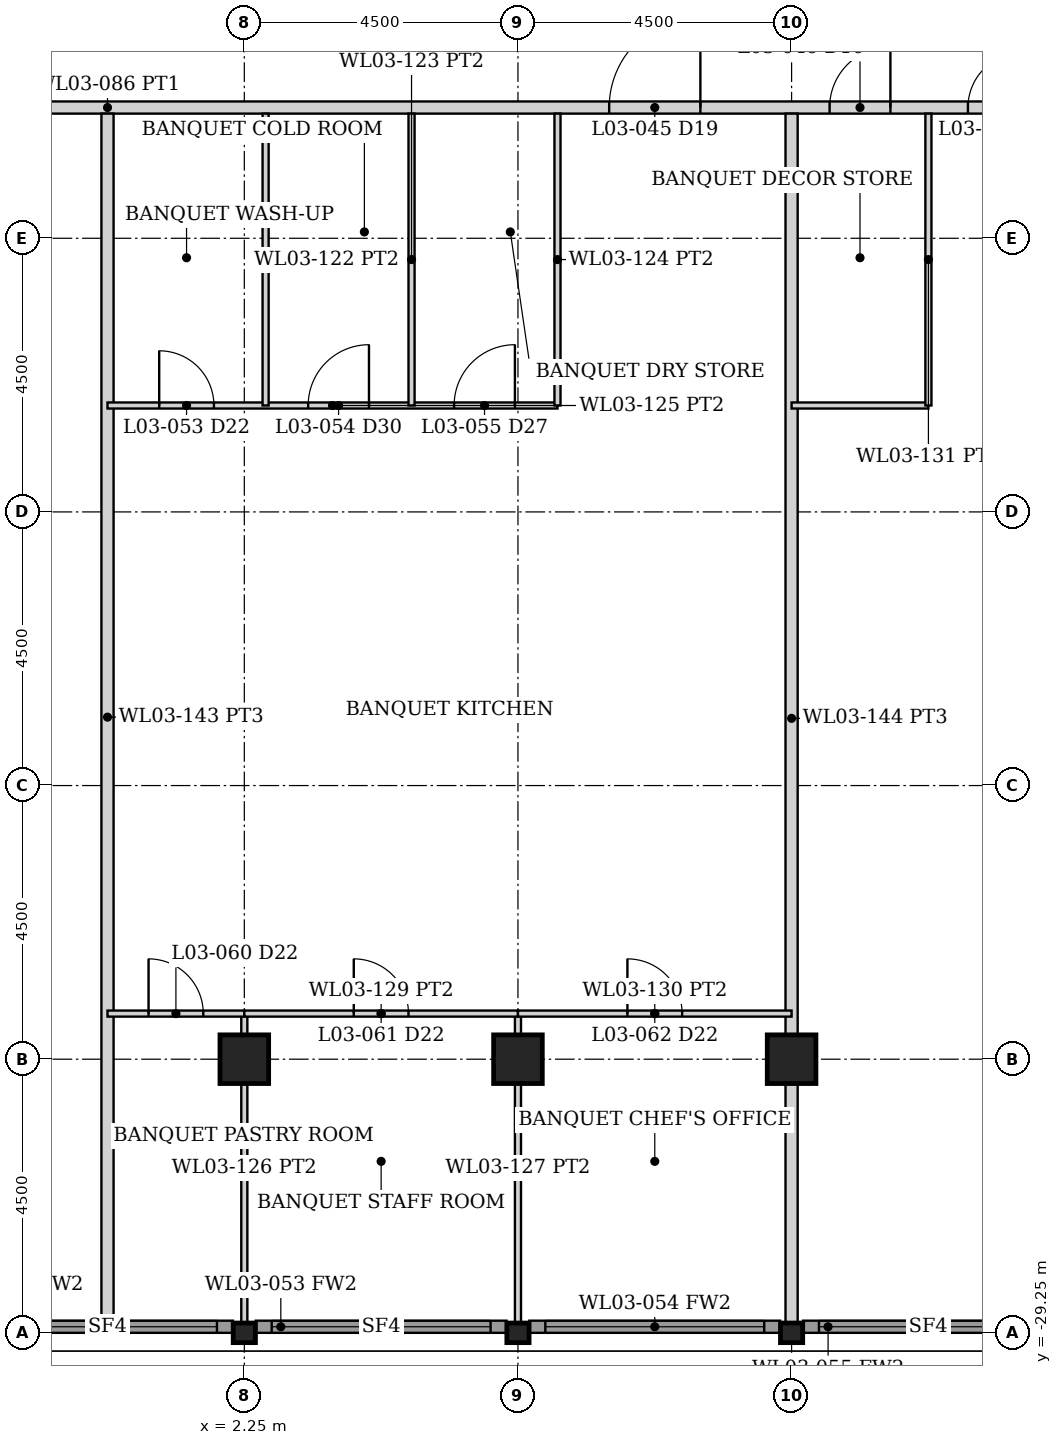
"""IFC4 building model, lengths in metres.
Left out: names, types, materials, properties, quantities, classifications, styles, units other than length and angle.
Written with IfcOpenShell. Run it as: python <this file> out.ifc"""

import sys

from ifc_helpers import new_model, si_unit, direction, frame, frame_2d, origin, origin_2d, place, context, subcontext, project, spatial, rectangle, hollow_rectangle, i_section, extrude, element, fill, save


model = new_model("IFC4")
c1 = context("Model", 3, precision=1e-05, world=origin(), true_north=direction((0.0, 1.0)))
c2 = subcontext(c1, "Body", "Model", "MODEL_VIEW")
j1 = project(units=[si_unit("LENGTHUNIT", "METRE"), si_unit("PLANEANGLEUNIT", "RADIAN")], contexts=[c1])
p1 = place(None, origin())
s1 = spatial("IfcSite", under=j1, at=p1, CompositionType="ELEMENT")
p2 = place(p1, origin())
s2 = spatial("IfcBuilding", under=s1, at=p2, CompositionType="ELEMENT")
p3 = place(p2, frame((0.0, 0.0, 16.0)))
s3 = spatial("IfcBuildingStorey", under=s2, at=p3, CompositionType="ELEMENT", Elevation=16.0)
for number, where, z_axis, x_axis in (
    (1, (2.25, -24.75, 0.0), (0.0, 0.0, 1.0), (0.0, 1.0, 0.0)),
    (2, (6.75, -24.75, 0.0), (0.0, 0.0, 1.0), (0.0, 1.0, 0.0)),
    (3, (11.25, -24.75, 0.0), (0.0, 0.0, 1.0), (0.0, 1.0, 0.0)),
):
    element("IfcColumn", number, at=place(p3, frame(where, z_axis=z_axis, x_axis=x_axis)), inside=s3, PredefinedType="COLUMN", context=c2, shape_type="SweptSolid", body=[
        extrude(hollow_rectangle(XDim=0.8, YDim=0.8, WallThickness=0.08, at=origin_2d()), origin(), (0.0, 0.0, 1.0), 5.5),
    ])
for number, where, z_axis, x_axis in (
    (4, (2.25, -29.25, 0.0), (0.0, 0.0, 1.0), (0.0, 1.0, 0.0)),
    (5, (6.75, -29.25, 0.0), (0.0, 0.0, 1.0), (0.0, 1.0, 0.0)),
    (6, (11.25, -29.25, 0.0), (0.0, 0.0, 1.0), (0.0, 1.0, 0.0)),
):
    element("IfcColumn", number, at=place(p3, frame(where, z_axis=z_axis, x_axis=x_axis)), inside=s3, PredefinedType="COLUMN", context=c2, shape_type="SweptSolid", body=[
        extrude(i_section(OverallWidth=0.322, OverallDepth=0.365, WebThickness=0.027, FlangeThickness=0.044, FilletRadius=0.015, at=origin_2d()), origin(), (0.0, 0.0, 1.0), 5.5),
    ])
p4 = place(p3, frame((-2.062, -29.15, 0.0), z_axis=(0.0, 0.0, 1.0), x_axis=(1.0, 0.0, 0.0)))
e7 = element("IfcWall", 7, at=p4, inside=s3, PredefinedType="SOLIDWALL", context=c2, shape_type="SweptSolid", body=[
    extrude(rectangle(XDim=4.125, YDim=0.2, at=frame_2d((2.062, 0.0))), origin(), (0.0, 0.0, 1.0), 4.633),
])
p5 = place(p4, frame((0.262, 0.0, 0.15)))
e8 = element("IfcOpeningElement", 8, at=p5, cuts=e7, PredefinedType="OPENING", context=c2, shape_type="SweptSolid", body=[
    extrude(rectangle(XDim=3.6, YDim=4.333, at=frame_2d((1.8, 2.167))), frame((0.0, 0.11, 0.0), z_axis=(0.0, -1.0, 0.0), x_axis=(1.0, 0.0, 0.0)), (0.0, 0.0, 1.0), 0.22),
])
p6 = place(p3, frame((2.438, -29.15, 0.0), z_axis=(0.0, 0.0, 1.0), x_axis=(1.0, 0.0, 0.0)))
e9 = element("IfcWall", 9, at=p6, inside=s3, PredefinedType="SOLIDWALL", context=c2, shape_type="SweptSolid", body=[
    extrude(rectangle(XDim=4.125, YDim=0.2, at=frame_2d((2.062, 0.0))), origin(), (0.0, 0.0, 1.0), 4.633),
])
p7 = place(p6, frame((0.262, 0.0, 0.15)))
e10 = element("IfcOpeningElement", 10, at=p7, cuts=e9, PredefinedType="OPENING", context=c2, shape_type="SweptSolid", body=[
    extrude(rectangle(XDim=3.6, YDim=4.333, at=frame_2d((1.8, 2.167))), frame((0.0, 0.11, 0.0), z_axis=(0.0, -1.0, 0.0), x_axis=(1.0, 0.0, 0.0)), (0.0, 0.0, 1.0), 0.22),
])
p8 = place(p3, frame((6.938, -29.15, 0.0), z_axis=(0.0, 0.0, 1.0), x_axis=(1.0, 0.0, 0.0)))
e11 = element("IfcWall", 11, at=p8, inside=s3, PredefinedType="SOLIDWALL", context=c2, shape_type="SweptSolid", body=[
    extrude(rectangle(XDim=4.125, YDim=0.2, at=frame_2d((2.062, 0.0))), origin(), (0.0, 0.0, 1.0), 4.633),
])
p9 = place(p8, frame((0.262, 0.0, 0.15)))
e12 = element("IfcOpeningElement", 12, at=p9, cuts=e11, PredefinedType="OPENING", context=c2, shape_type="SweptSolid", body=[
    extrude(rectangle(XDim=3.6, YDim=4.333, at=frame_2d((1.8, 2.167))), frame((0.0, 0.11, 0.0), z_axis=(0.0, -1.0, 0.0), x_axis=(1.0, 0.0, 0.0)), (0.0, 0.0, 1.0), 0.22),
])
p10 = place(p3, frame((11.438, -29.15, 0.0), z_axis=(0.0, 0.0, 1.0), x_axis=(1.0, 0.0, 0.0)))
e13 = element("IfcWall", 13, at=p10, inside=s3, PredefinedType="SOLIDWALL", context=c2, shape_type="SweptSolid", body=[
    extrude(rectangle(XDim=4.125, YDim=0.2, at=frame_2d((2.062, 0.0))), origin(), (0.0, 0.0, 1.0), 4.633),
])
p11 = place(p10, frame((0.262, 0.0, 0.15)))
e14 = element("IfcOpeningElement", 14, at=p11, cuts=e13, PredefinedType="OPENING", context=c2, shape_type="SweptSolid", body=[
    extrude(rectangle(XDim=3.6, YDim=4.333, at=frame_2d((1.8, 2.167))), frame((0.0, 0.11, 0.0), z_axis=(0.0, -1.0, 0.0), x_axis=(1.0, 0.0, 0.0)), (0.0, 0.0, 1.0), 0.22),
])
p12 = place(p3, frame((-25.075, -9.1, 0.0), z_axis=(0.0, 0.0, 1.0), x_axis=(1.0, 0.0, 0.0)))
e15 = element("IfcWall", 15, at=p12, inside=s3, PredefinedType="PARTITIONING", context=c2, shape_type="SweptSolid", body=[
    extrude(rectangle(XDim=50.15, YDim=0.2, at=frame_2d((25.075, 0.0))), origin(), (0.0, 0.0, 1.0), 4.329),
])
p13 = place(p12, frame((2.125, 0.0, 0.0)))
e16 = element("IfcOpeningElement", 16, at=p13, cuts=e15, PredefinedType="OPENING", context=c2, shape_type="SweptSolid", body=[
    extrude(rectangle(XDim=0.9, YDim=2.1, at=frame_2d((0.45, 1.05))), frame((0.0, 0.11, 0.0), z_axis=(0.0, -1.0, 0.0), x_axis=(1.0, 0.0, 0.0)), (0.0, 0.0, 1.0), 0.22),
])
p14 = place(p12, frame((10.225, 0.0, 0.0)))
e17 = element("IfcOpeningElement", 17, at=p14, cuts=e15, PredefinedType="OPENING", context=c2, shape_type="SweptSolid", body=[
    extrude(rectangle(XDim=0.9, YDim=2.1, at=frame_2d((0.45, 1.05))), frame((0.0, 0.11, 0.0), z_axis=(0.0, -1.0, 0.0), x_axis=(1.0, 0.0, 0.0)), (0.0, 0.0, 1.0), 0.22),
])
p15 = place(p12, frame((16.7, 0.0, 0.0)))
e18 = element("IfcOpeningElement", 18, at=p15, cuts=e15, PredefinedType="OPENING", context=c2, shape_type="SweptSolid", body=[
    extrude(rectangle(XDim=1.0, YDim=2.1, at=frame_2d((0.5, 1.05))), frame((0.0, 0.11, 0.0), z_axis=(0.0, -1.0, 0.0), x_axis=(1.0, 0.0, 0.0)), (0.0, 0.0, 1.0), 0.22),
])
p16 = place(p12, frame((14.525, 0.0, 0.0)))
e19 = element("IfcOpeningElement", 19, at=p16, cuts=e15, PredefinedType="OPENING", context=c2, shape_type="SweptSolid", body=[
    extrude(rectangle(XDim=0.9, YDim=2.1, at=frame_2d((0.45, 1.05))), frame((0.0, 0.11, 0.0), z_axis=(0.0, -1.0, 0.0), x_axis=(1.0, 0.0, 0.0)), (0.0, 0.0, 1.0), 0.22),
])
p17 = place(p12, frame((21.25, 0.0, 0.0)))
e20 = element("IfcOpeningElement", 20, at=p17, cuts=e15, PredefinedType="OPENING", context=c2, shape_type="SweptSolid", body=[
    extrude(rectangle(XDim=0.9, YDim=2.1, at=frame_2d((0.45, 1.05))), frame((0.0, 0.11, 0.0), z_axis=(0.0, -1.0, 0.0), x_axis=(1.0, 0.0, 0.0)), (0.0, 0.0, 1.0), 0.22),
])
p18 = place(p12, frame((33.325, 0.0, 0.0)))
e21 = element("IfcOpeningElement", 21, at=p18, cuts=e15, PredefinedType="OPENING", context=c2, shape_type="SweptSolid", body=[
    extrude(rectangle(XDim=1.5, YDim=2.1, at=frame_2d((0.75, 1.05))), frame((0.0, 0.11, 0.0), z_axis=(0.0, -1.0, 0.0), x_axis=(1.0, 0.0, 0.0)), (0.0, 0.0, 1.0), 0.22),
])
p19 = place(p12, frame((36.95, 0.0, 0.0)))
e22 = element("IfcOpeningElement", 22, at=p19, cuts=e15, PredefinedType="OPENING", context=c2, shape_type="SweptSolid", body=[
    extrude(rectangle(XDim=1.0, YDim=2.1, at=frame_2d((0.5, 1.05))), frame((0.0, 0.11, 0.0), z_axis=(0.0, -1.0, 0.0), x_axis=(1.0, 0.0, 0.0)), (0.0, 0.0, 1.0), 0.22),
])
p20 = place(p12, frame((44.825, 0.0, 0.0)))
e23 = element("IfcOpeningElement", 23, at=p20, cuts=e15, PredefinedType="OPENING", context=c2, shape_type="SweptSolid", body=[
    extrude(rectangle(XDim=1.0, YDim=2.1, at=frame_2d((0.5, 1.05))), frame((0.0, 0.11, 0.0), z_axis=(0.0, -1.0, 0.0), x_axis=(1.0, 0.0, 0.0)), (0.0, 0.0, 1.0), 0.22),
])
p21 = place(p12, frame((39.225, 0.0, 0.0)))
e24 = element("IfcOpeningElement", 24, at=p21, cuts=e15, PredefinedType="OPENING", context=c2, shape_type="SweptSolid", body=[
    extrude(rectangle(XDim=0.9, YDim=2.1, at=frame_2d((0.45, 1.05))), frame((0.0, 0.11, 0.0), z_axis=(0.0, -1.0, 0.0), x_axis=(1.0, 0.0, 0.0)), (0.0, 0.0, 1.0), 0.22),
])
p22 = place(p3, frame((0.0, -29.05, 0.0), z_axis=(0.0, 0.0, 1.0), x_axis=(0.0, 1.0, 0.0)))
e25 = element("IfcWall", 25, at=p22, inside=s3, PredefinedType="PARTITIONING", context=c2, shape_type="SweptSolid", body=[
    extrude(rectangle(XDim=19.85, YDim=0.2, at=frame_2d((9.925, 0.0))), origin(), (0.0, 0.0, 1.0), 4.329),
])
p23 = place(p3, frame((11.25, -29.089, 0.0), z_axis=(0.0, 0.0, 1.0), x_axis=(0.0, 1.0, 0.0)))
e26 = element("IfcWall", 26, at=p23, inside=s3, PredefinedType="PARTITIONING", context=c2, shape_type="SweptSolid", body=[
    extrude(rectangle(XDim=19.889, YDim=0.2, at=frame_2d((9.944, 0.0))), origin(), (0.0, 0.0, 1.0), 4.329),
])
p24 = place(p3, frame((0.0, -14.0, 0.0), z_axis=(0.0, 0.0, 1.0), x_axis=(1.0, 0.0, 0.0)))
e27 = element("IfcWall", 27, at=p24, inside=s3, PredefinedType="PARTITIONING", context=c2, shape_type="SweptSolid", body=[
    extrude(rectangle(XDim=7.4, YDim=0.1, at=frame_2d((3.7, 0.0))), origin(), (0.0, 0.0, 1.0), 4.329),
])
p25 = place(p24, frame((0.85, 0.0, 0.0)))
e28 = element("IfcOpeningElement", 28, at=p25, cuts=e27, PredefinedType="OPENING", context=c2, shape_type="SweptSolid", body=[
    extrude(rectangle(XDim=0.9, YDim=2.1, at=frame_2d((0.45, 1.05))), frame((0.0, 0.06, 0.0), z_axis=(0.0, -1.0, 0.0), x_axis=(1.0, 0.0, 0.0)), (0.0, 0.0, 1.0), 0.12),
])
p26 = place(p24, frame((3.3, 0.0, 0.0)))
e29 = element("IfcOpeningElement", 29, at=p26, cuts=e27, PredefinedType="OPENING", context=c2, shape_type="SweptSolid", body=[
    extrude(rectangle(XDim=1.0, YDim=2.1, at=frame_2d((0.5, 1.05))), frame((0.0, 0.06, 0.0), z_axis=(0.0, -1.0, 0.0), x_axis=(1.0, 0.0, 0.0)), (0.0, 0.0, 1.0), 0.12),
])
p27 = place(p24, frame((5.7, 0.0, 0.0)))
e30 = element("IfcOpeningElement", 30, at=p27, cuts=e27, PredefinedType="OPENING", context=c2, shape_type="SweptSolid", body=[
    extrude(rectangle(XDim=1.0, YDim=2.1, at=frame_2d((0.5, 1.05))), frame((0.0, 0.06, 0.0), z_axis=(0.0, -1.0, 0.0), x_axis=(1.0, 0.0, 0.0)), (0.0, 0.0, 1.0), 0.12),
])
for number, where, z_axis, x_axis in (
    (31, (2.6, -14.0, 0.0), (0.0, 0.0, 1.0), (0.0, 1.0, 0.0)),
    (32, (5.0, -14.0, 0.0), (0.0, 0.0, 1.0), (0.0, 1.0, 0.0)),
    (33, (7.4, -14.0, 0.0), (0.0, 0.0, 1.0), (0.0, 1.0, 0.0)),
):
    element("IfcWall", number, at=place(p3, frame(where, z_axis=z_axis, x_axis=x_axis)), inside=s3, PredefinedType="PARTITIONING", context=c2, shape_type="SweptSolid", body=[
        extrude(rectangle(XDim=4.8, YDim=0.1, at=frame_2d((2.4, 0.0))), origin(), (0.0, 0.0, 1.0), 4.329),
    ])
p28 = place(p3, frame((2.25, -29.089, 0.0), z_axis=(0.0, 0.0, 1.0), x_axis=(0.0, 1.0, 0.0)))
e34 = element("IfcWall", 34, at=p28, inside=s3, PredefinedType="PARTITIONING", context=c2, shape_type="SweptSolid", body=[
    extrude(rectangle(XDim=5.089, YDim=0.1, at=frame_2d((2.544, 0.0))), origin(), (0.0, 0.0, 1.0), 4.329),
])
p29 = place(p3, frame((0.0, -24.0, 0.0), z_axis=(0.0, 0.0, 1.0), x_axis=(1.0, 0.0, 0.0)))
e35 = element("IfcWall", 35, at=p29, inside=s3, PredefinedType="PARTITIONING", context=c2, shape_type="SweptSolid", body=[
    extrude(rectangle(XDim=2.25, YDim=0.1, at=frame_2d((1.125, 0.0))), origin(), (0.0, 0.0, 1.0), 4.329),
])
p30 = place(p29, frame((0.675, 0.0, 0.0)))
e36 = element("IfcOpeningElement", 36, at=p30, cuts=e35, PredefinedType="OPENING", context=c2, shape_type="SweptSolid", body=[
    extrude(rectangle(XDim=0.9, YDim=2.1, at=frame_2d((0.45, 1.05))), frame((0.0, 0.06, 0.0), z_axis=(0.0, -1.0, 0.0), x_axis=(1.0, 0.0, 0.0)), (0.0, 0.0, 1.0), 0.12),
])
p31 = place(p3, frame((6.75, -29.089, 0.0), z_axis=(0.0, 0.0, 1.0), x_axis=(0.0, 1.0, 0.0)))
e37 = element("IfcWall", 37, at=p31, inside=s3, PredefinedType="PARTITIONING", context=c2, shape_type="SweptSolid", body=[
    extrude(rectangle(XDim=5.089, YDim=0.1, at=frame_2d((2.544, 0.0))), origin(), (0.0, 0.0, 1.0), 4.329),
])
p32 = place(p3, frame((2.25, -24.0, 0.0), z_axis=(0.0, 0.0, 1.0), x_axis=(1.0, 0.0, 0.0)))
e38 = element("IfcWall", 38, at=p32, inside=s3, PredefinedType="PARTITIONING", context=c2, shape_type="SweptSolid", body=[
    extrude(rectangle(XDim=4.5, YDim=0.1, at=frame_2d((2.25, 0.0))), origin(), (0.0, 0.0, 1.0), 4.329),
])
p33 = place(p32, frame((1.8, 0.0, 0.0)))
e39 = element("IfcOpeningElement", 39, at=p33, cuts=e38, PredefinedType="OPENING", context=c2, shape_type="SweptSolid", body=[
    extrude(rectangle(XDim=0.9, YDim=2.1, at=frame_2d((0.45, 1.05))), frame((0.0, 0.06, 0.0), z_axis=(0.0, -1.0, 0.0), x_axis=(1.0, 0.0, 0.0)), (0.0, 0.0, 1.0), 0.12),
])
p34 = place(p3, frame((6.75, -24.0, 0.0), z_axis=(0.0, 0.0, 1.0), x_axis=(1.0, 0.0, 0.0)))
e40 = element("IfcWall", 40, at=p34, inside=s3, PredefinedType="PARTITIONING", context=c2, shape_type="SweptSolid", body=[
    extrude(rectangle(XDim=4.5, YDim=0.1, at=frame_2d((2.25, 0.0))), origin(), (0.0, 0.0, 1.0), 4.329),
])
p35 = place(p34, frame((1.8, 0.0, 0.0)))
e41 = element("IfcOpeningElement", 41, at=p35, cuts=e40, PredefinedType="OPENING", context=c2, shape_type="SweptSolid", body=[
    extrude(rectangle(XDim=0.9, YDim=2.1, at=frame_2d((0.45, 1.05))), frame((0.0, 0.06, 0.0), z_axis=(0.0, -1.0, 0.0), x_axis=(1.0, 0.0, 0.0)), (0.0, 0.0, 1.0), 0.12),
])
p36 = place(p3, frame((11.25, -14.0, 0.0), z_axis=(0.0, 0.0, 1.0), x_axis=(1.0, 0.0, 0.0)))
e42 = element("IfcWall", 42, at=p36, inside=s3, PredefinedType="PARTITIONING", context=c2, shape_type="SweptSolid", body=[
    extrude(rectangle(XDim=2.25, YDim=0.1, at=frame_2d((1.125, 0.0))), origin(), (0.0, 0.0, 1.0), 4.329),
])
p37 = place(p3, frame((13.5, -14.0, 0.0), z_axis=(0.0, 0.0, 1.0), x_axis=(0.0, 1.0, 0.0)))
e43 = element("IfcWall", 43, at=p37, inside=s3, PredefinedType="PARTITIONING", context=c2, shape_type="SweptSolid", body=[
    extrude(rectangle(XDim=4.8, YDim=0.1, at=frame_2d((2.4, 0.0))), origin(), (0.0, 0.0, 1.0), 4.329),
])
p38 = place(p5, origin())
e44 = element("IfcWindow", 44, at=p38, inside=s3, PartitioningType="SINGLE_PANEL", PredefinedType="WINDOW", context=c2, shape_type="SweptSolid", body=[
    extrude(rectangle(XDim=3.6, YDim=4.333, at=frame_2d((1.8, 2.167))), frame((0.0, 0.03, 0.0), z_axis=(0.0, -1.0, 0.0), x_axis=(1.0, 0.0, 0.0)), (0.0, 0.0, 1.0), 0.06),
])
fill(e8, e44)
p39 = place(p7, origin())
e45 = element("IfcWindow", 45, at=p39, inside=s3, PartitioningType="SINGLE_PANEL", PredefinedType="WINDOW", context=c2, shape_type="SweptSolid", body=[
    extrude(rectangle(XDim=3.6, YDim=4.333, at=frame_2d((1.8, 2.167))), frame((0.0, 0.03, 0.0), z_axis=(0.0, -1.0, 0.0), x_axis=(1.0, 0.0, 0.0)), (0.0, 0.0, 1.0), 0.06),
])
fill(e10, e45)
p40 = place(p9, origin())
e46 = element("IfcWindow", 46, at=p40, inside=s3, PartitioningType="SINGLE_PANEL", PredefinedType="WINDOW", context=c2, shape_type="SweptSolid", body=[
    extrude(rectangle(XDim=3.6, YDim=4.333, at=frame_2d((1.8, 2.167))), frame((0.0, 0.03, 0.0), z_axis=(0.0, -1.0, 0.0), x_axis=(1.0, 0.0, 0.0)), (0.0, 0.0, 1.0), 0.06),
])
fill(e12, e46)
p41 = place(p11, origin())
e47 = element("IfcWindow", 47, at=p41, inside=s3, PartitioningType="SINGLE_PANEL", PredefinedType="WINDOW", context=c2, shape_type="SweptSolid", body=[
    extrude(rectangle(XDim=3.6, YDim=4.333, at=frame_2d((1.8, 2.167))), frame((0.0, 0.03, 0.0), z_axis=(0.0, -1.0, 0.0), x_axis=(1.0, 0.0, 0.0)), (0.0, 0.0, 1.0), 0.06),
])
fill(e14, e47)
p42 = place(p25, origin())
e48 = element("IfcDoor", 48, at=p42, inside=s3, OperationType="SINGLE_SWING_LEFT", PredefinedType="DOOR", context=c2, shape_type="SweptSolid", body=[
    extrude(rectangle(XDim=0.9, YDim=2.1, at=frame_2d((0.45, 1.05))), frame((0.0, 0.025, 0.0), z_axis=(0.0, -1.0, 0.0), x_axis=(1.0, 0.0, 0.0)), (0.0, 0.0, 1.0), 0.05),
])
fill(e28, e48)
p43 = place(p26, origin())
e49 = element("IfcDoor", 49, at=p43, inside=s3, OperationType="SINGLE_SWING_RIGHT", PredefinedType="DOOR", context=c2, shape_type="SweptSolid", body=[
    extrude(rectangle(XDim=1.0, YDim=2.1, at=frame_2d((0.5, 1.05))), frame((0.0, 0.025, 0.0), z_axis=(0.0, -1.0, 0.0), x_axis=(1.0, 0.0, 0.0)), (0.0, 0.0, 1.0), 0.05),
])
fill(e29, e49)
p44 = place(p27, origin())
e50 = element("IfcDoor", 50, at=p44, inside=s3, OperationType="SINGLE_SWING_RIGHT", PredefinedType="DOOR", context=c2, shape_type="SweptSolid", body=[
    extrude(rectangle(XDim=1.0, YDim=2.1, at=frame_2d((0.5, 1.05))), frame((0.0, 0.025, 0.0), z_axis=(0.0, -1.0, 0.0), x_axis=(1.0, 0.0, 0.0)), (0.0, 0.0, 1.0), 0.05),
])
fill(e30, e50)
p45 = place(p30, origin())
e51 = element("IfcDoor", 51, at=p45, inside=s3, OperationType="SINGLE_SWING_LEFT", PredefinedType="DOOR", context=c2, shape_type="SweptSolid", body=[
    extrude(rectangle(XDim=0.9, YDim=2.1, at=frame_2d((0.45, 1.05))), frame((0.0, 0.025, 0.0), z_axis=(0.0, -1.0, 0.0), x_axis=(1.0, 0.0, 0.0)), (0.0, 0.0, 1.0), 0.05),
])
fill(e36, e51)
p46 = place(p33, origin())
e52 = element("IfcDoor", 52, at=p46, inside=s3, OperationType="SINGLE_SWING_LEFT", PredefinedType="DOOR", context=c2, shape_type="SweptSolid", body=[
    extrude(rectangle(XDim=0.9, YDim=2.1, at=frame_2d((0.45, 1.05))), frame((0.0, 0.025, 0.0), z_axis=(0.0, -1.0, 0.0), x_axis=(1.0, 0.0, 0.0)), (0.0, 0.0, 1.0), 0.05),
])
fill(e39, e52)
p47 = place(p35, origin())
e53 = element("IfcDoor", 53, at=p47, inside=s3, OperationType="SINGLE_SWING_LEFT", PredefinedType="DOOR", context=c2, shape_type="SweptSolid", body=[
    extrude(rectangle(XDim=0.9, YDim=2.1, at=frame_2d((0.45, 1.05))), frame((0.0, 0.025, 0.0), z_axis=(0.0, -1.0, 0.0), x_axis=(1.0, 0.0, 0.0)), (0.0, 0.0, 1.0), 0.05),
])
fill(e41, e53)
p48 = place(p18, origin())
e54 = element("IfcDoor", 54, at=p48, inside=s3, OperationType="SINGLE_SWING_RIGHT", PredefinedType="DOOR", context=c2, shape_type="SweptSolid", body=[
    extrude(rectangle(XDim=1.5, YDim=2.1, at=frame_2d((0.75, 1.05))), frame((0.0, 0.025, 0.0), z_axis=(0.0, -1.0, 0.0), x_axis=(1.0, 0.0, 0.0)), (0.0, 0.0, 1.0), 0.05),
])
fill(e21, e54)
p49 = place(p19, origin())
e55 = element("IfcDoor", 55, at=p49, inside=s3, OperationType="SINGLE_SWING_RIGHT", PredefinedType="DOOR", context=c2, shape_type="SweptSolid", body=[
    extrude(rectangle(XDim=1.0, YDim=2.1, at=frame_2d((0.5, 1.05))), frame((0.0, 0.025, 0.0), z_axis=(0.0, -1.0, 0.0), x_axis=(1.0, 0.0, 0.0)), (0.0, 0.0, 1.0), 0.05),
])
fill(e22, e55)
p50 = place(p21, origin())
e56 = element("IfcDoor", 56, at=p50, inside=s3, OperationType="SINGLE_SWING_RIGHT", PredefinedType="DOOR", context=c2, shape_type="SweptSolid", body=[
    extrude(rectangle(XDim=0.9, YDim=2.1, at=frame_2d((0.45, 1.05))), frame((0.0, 0.025, 0.0), z_axis=(0.0, -1.0, 0.0), x_axis=(1.0, 0.0, 0.0)), (0.0, 0.0, 1.0), 0.05),
])
fill(e24, e56)
save(model, sys.argv[1])
